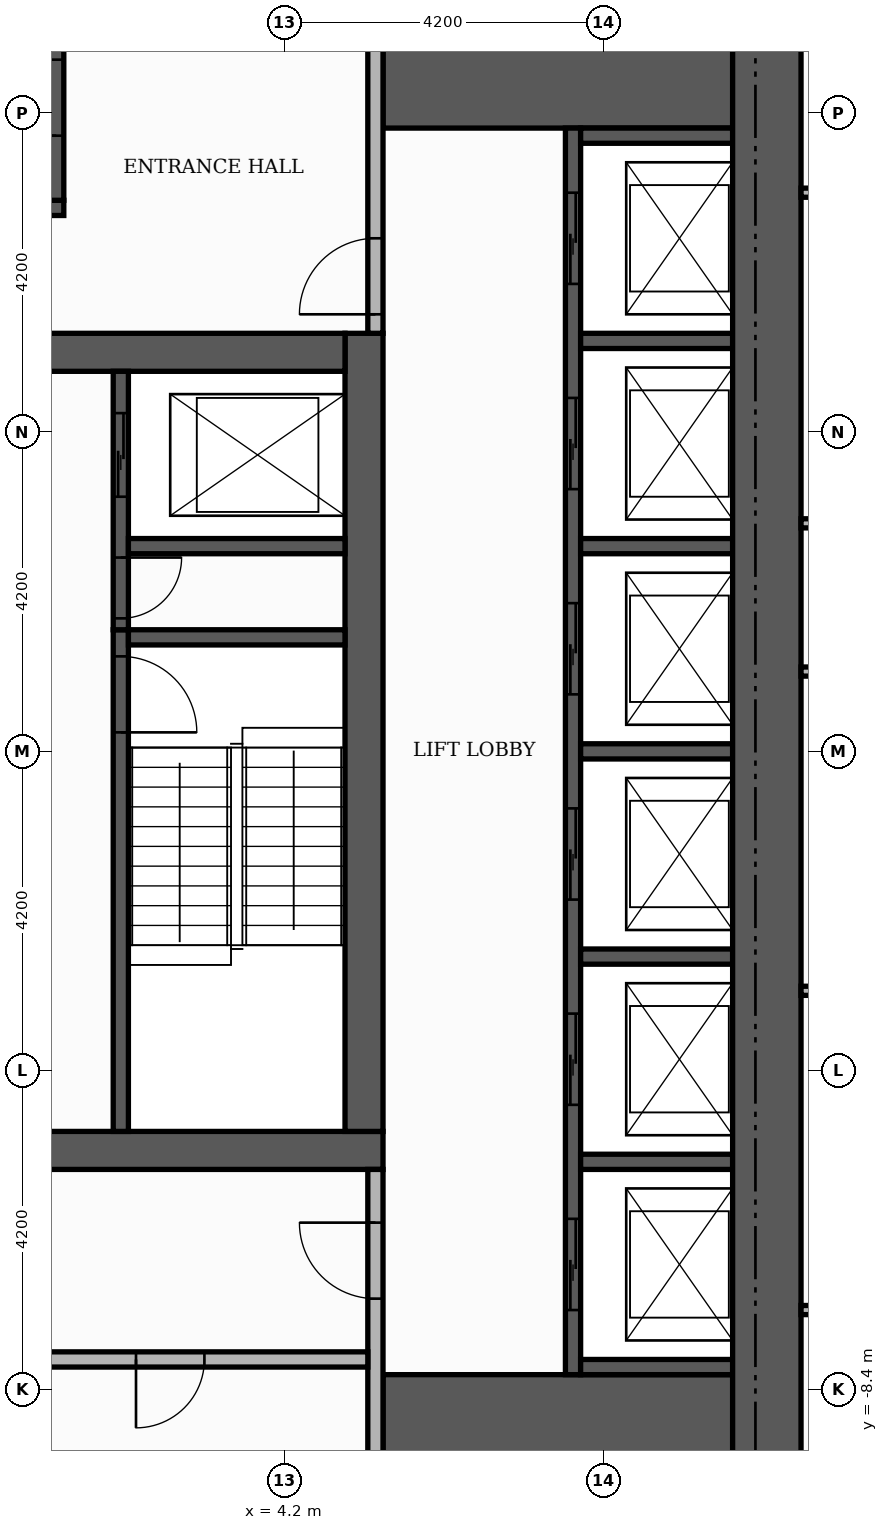
"""IFC4 building model, lengths in metres.
Left out: names, types, materials, properties, quantities, classifications, styles, units other than length and angle.
Written with IfcOpenShell. Run it as: python <this file> out.ifc"""

import sys

from ifc_helpers import new_model, si_unit, direction, frame, frame_2d, origin, place, context, subcontext, project, spatial, rectangle, extrude, element, fill, save


model = new_model("IFC4")
c1 = context("Model", 3, precision=1e-05, world=origin(), true_north=direction((0.0, 1.0)))
c2 = subcontext(c1, "Body", "Model", "MODEL_VIEW")
j1 = project(units=[si_unit("LENGTHUNIT", "METRE"), si_unit("PLANEANGLEUNIT", "RADIAN")], contexts=[c1])
p1 = place(None, origin())
s1 = spatial("IfcSite", under=j1, at=p1, CompositionType="ELEMENT")
p2 = place(p1, origin())
s2 = spatial("IfcBuilding", under=s1, at=p2, CompositionType="ELEMENT")
p3 = place(p2, frame((0.0, 0.0, 196.2)))
s3 = spatial("IfcBuildingStorey", under=s2, at=p3, CompositionType="ELEMENT", Elevation=196.2)
p4 = place(p3, frame((-5.5, -5.25, 0.0), z_axis=(0.0, 0.0, 1.0), x_axis=(1.0, 0.0, 0.0)))
e1 = element("IfcWall", 1, at=p4, inside=s3, PredefinedType="SHEAR", context=c2, shape_type="SweptSolid", body=[
    extrude(rectangle(XDim=11.0, YDim=0.5, at=frame_2d((5.5, 0.0))), origin(), (0.0, 0.0, 1.0), 3.48),
])
p5 = place(p4, frame((4.9, 0.0, 0.0)))
e2 = element("IfcOpeningElement", 2, at=p5, cuts=e1, PredefinedType="OPENING", context=c2, shape_type="SweptSolid", body=[
    extrude(rectangle(XDim=1.2, YDim=2.1, at=frame_2d((0.6, 1.05))), frame((0.0, 0.26, 0.0), z_axis=(0.0, -1.0, 0.0), x_axis=(1.0, 0.0, 0.0)), (0.0, 0.0, 1.0), 0.52),
])
p6 = place(p3, frame((5.25, -5.0, 0.0), z_axis=(0.0, 0.0, 1.0), x_axis=(0.0, 1.0, 0.0)))
e3 = element("IfcWall", 3, at=p6, inside=s3, PredefinedType="SHEAR", context=c2, shape_type="SweptSolid", body=[
    extrude(rectangle(XDim=10.5, YDim=0.5, at=frame_2d((5.25, 0.0))), origin(), (0.0, 0.0, 1.0), 3.48),
])
p7 = place(p3, frame((-5.0, 5.25, 0.0), z_axis=(0.0, 0.0, 1.0), x_axis=(1.0, 0.0, 0.0)))
e4 = element("IfcWall", 4, at=p7, inside=s3, PredefinedType="SHEAR", context=c2, shape_type="SweptSolid", body=[
    extrude(rectangle(XDim=10.0, YDim=0.5, at=frame_2d((5.0, 0.0))), origin(), (0.0, 0.0, 1.0), 3.48),
])
p8 = place(p7, frame((4.4, 0.0, 0.0)))
e5 = element("IfcOpeningElement", 5, at=p8, cuts=e4, PredefinedType="OPENING", context=c2, shape_type="SweptSolid", body=[
    extrude(rectangle(XDim=1.2, YDim=2.1, at=frame_2d((0.6, 1.05))), frame((0.0, 0.26, 0.0), z_axis=(0.0, -1.0, 0.0), x_axis=(1.0, 0.0, 0.0)), (0.0, 0.0, 1.0), 0.52),
])
for number, where, z_axis, x_axis in (
    (6, (5.5, -9.15, 0.0), (0.0, 0.0, 1.0), (1.0, 0.0, 0.0)),
    (7, (5.5, 9.15, 0.0), (0.0, 0.0, 1.0), (1.0, 0.0, 0.0)),
):
    element("IfcWall", number, at=place(p3, frame(where, z_axis=z_axis, x_axis=x_axis)), inside=s3, PredefinedType="SHEAR", context=c2, shape_type="SweptSolid", body=[
        extrude(rectangle(XDim=4.6, YDim=1.9, at=frame_2d((2.3, 0.0))), origin(), (0.0, 0.0, 1.0), 3.48),
    ])
p9 = place(p3, frame((2.05, -5.0, 0.0), z_axis=(0.0, 0.0, 1.0), x_axis=(0.0, 1.0, 0.0)))
e8 = element("IfcWall", 8, at=p9, inside=s3, PredefinedType="SHEAR", context=c2, shape_type="SweptSolid", body=[
    extrude(rectangle(XDim=6.6, YDim=0.2, at=frame_2d((3.3, 0.0))), origin(), (0.0, 0.0, 1.0), 3.48),
])
p10 = place(p9, frame((5.25, 0.0, 0.0)))
e9 = element("IfcOpeningElement", 9, at=p10, cuts=e8, PredefinedType="OPENING", context=c2, shape_type="SweptSolid", body=[
    extrude(rectangle(XDim=1.0, YDim=2.1, at=frame_2d((0.5, 1.05))), frame((0.0, 0.11, 0.0), z_axis=(0.0, -1.0, 0.0), x_axis=(1.0, 0.0, 0.0)), (0.0, 0.0, 1.0), 0.22),
])
p11 = place(p3, frame((2.15, 1.5, 0.0), z_axis=(0.0, 0.0, 1.0), x_axis=(1.0, 0.0, 0.0)))
e10 = element("IfcWall", 10, at=p11, inside=s3, PredefinedType="SHEAR", context=c2, shape_type="SweptSolid", body=[
    extrude(rectangle(XDim=2.85, YDim=0.2, at=frame_2d((1.425, 0.0))), origin(), (0.0, 0.0, 1.0), 3.48),
])
p12 = place(p3, frame((-5.5, 7.15, 0.0), z_axis=(0.0, 0.0, 1.0), x_axis=(1.0, 0.0, 0.0)))
e11 = element("IfcWall", 11, at=p12, inside=s3, PredefinedType="SHEAR", context=c2, shape_type="SweptSolid", body=[
    extrude(rectangle(XDim=6.8, YDim=0.2, at=frame_2d((3.4, 0.0))), origin(), (0.0, 0.0, 1.0), 3.48),
])
p13 = place(p3, frame((1.2, 7.25, 0.0), z_axis=(0.0, 0.0, 1.0), x_axis=(0.0, 1.0, 0.0)))
e12 = element("IfcWall", 12, at=p13, inside=s3, PredefinedType="SHEAR", context=c2, shape_type="SweptSolid", body=[
    extrude(rectangle(XDim=2.85, YDim=0.2, at=frame_2d((1.425, 0.0))), origin(), (0.0, 0.0, 1.0), 3.48),
])
p14 = place(p13, frame((0.85, 0.0, 0.0)))
e13 = element("IfcOpeningElement", 13, at=p14, cuts=e12, PredefinedType="OPENING", context=c2, shape_type="SweptSolid", body=[
    extrude(rectangle(XDim=1.0, YDim=2.1, at=frame_2d((0.5, 1.05))), frame((0.0, 0.11, 0.0), z_axis=(0.0, -1.0, 0.0), x_axis=(1.0, 0.0, 0.0)), (0.0, 0.0, 1.0), 0.22),
])
p15 = place(p3, frame((8.0, -8.2, 0.0), z_axis=(0.0, 0.0, 1.0), x_axis=(0.0, 1.0, 0.0)))
e14 = element("IfcWall", 14, at=p15, inside=s3, PredefinedType="SHEAR", context=c2, shape_type="SweptSolid", body=[
    extrude(rectangle(XDim=16.4, YDim=0.2, at=frame_2d((8.2, 0.0))), origin(), (0.0, 0.0, 1.0), 3.48),
])
p16 = place(p15, frame((0.85, 0.0, 0.0)))
e15 = element("IfcOpeningElement", 15, at=p16, cuts=e14, PredefinedType="OPENING", context=c2, shape_type="SweptSolid", body=[
    extrude(rectangle(XDim=1.2, YDim=2.1, at=frame_2d((0.6, 1.05))), frame((0.0, 0.11, 0.0), z_axis=(0.0, -1.0, 0.0), x_axis=(1.0, 0.0, 0.0)), (0.0, 0.0, 1.0), 0.22),
])
p17 = place(p15, frame((3.55, 0.0, 0.0)))
e16 = element("IfcOpeningElement", 16, at=p17, cuts=e14, PredefinedType="OPENING", context=c2, shape_type="SweptSolid", body=[
    extrude(rectangle(XDim=1.2, YDim=2.1, at=frame_2d((0.6, 1.05))), frame((0.0, 0.11, 0.0), z_axis=(0.0, -1.0, 0.0), x_axis=(1.0, 0.0, 0.0)), (0.0, 0.0, 1.0), 0.22),
])
p18 = place(p15, frame((6.25, 0.0, 0.0)))
e17 = element("IfcOpeningElement", 17, at=p18, cuts=e14, PredefinedType="OPENING", context=c2, shape_type="SweptSolid", body=[
    extrude(rectangle(XDim=1.2, YDim=2.1, at=frame_2d((0.6, 1.05))), frame((0.0, 0.11, 0.0), z_axis=(0.0, -1.0, 0.0), x_axis=(1.0, 0.0, 0.0)), (0.0, 0.0, 1.0), 0.22),
])
p19 = place(p15, frame((8.95, 0.0, 0.0)))
e18 = element("IfcOpeningElement", 18, at=p19, cuts=e14, PredefinedType="OPENING", context=c2, shape_type="SweptSolid", body=[
    extrude(rectangle(XDim=1.2, YDim=2.1, at=frame_2d((0.6, 1.05))), frame((0.0, 0.11, 0.0), z_axis=(0.0, -1.0, 0.0), x_axis=(1.0, 0.0, 0.0)), (0.0, 0.0, 1.0), 0.22),
])
p20 = place(p15, frame((11.65, 0.0, 0.0)))
e19 = element("IfcOpeningElement", 19, at=p20, cuts=e14, PredefinedType="OPENING", context=c2, shape_type="SweptSolid", body=[
    extrude(rectangle(XDim=1.2, YDim=2.1, at=frame_2d((0.6, 1.05))), frame((0.0, 0.11, 0.0), z_axis=(0.0, -1.0, 0.0), x_axis=(1.0, 0.0, 0.0)), (0.0, 0.0, 1.0), 0.22),
])
p21 = place(p15, frame((14.35, 0.0, 0.0)))
e20 = element("IfcOpeningElement", 20, at=p21, cuts=e14, PredefinedType="OPENING", context=c2, shape_type="SweptSolid", body=[
    extrude(rectangle(XDim=1.2, YDim=2.1, at=frame_2d((0.6, 1.05))), frame((0.0, 0.11, 0.0), z_axis=(0.0, -1.0, 0.0), x_axis=(1.0, 0.0, 0.0)), (0.0, 0.0, 1.0), 0.22),
])
for number, where, z_axis, x_axis in (
    (21, (8.1, -8.1, 0.0), (0.0, 0.0, 1.0), (1.0, 0.0, 0.0)),
    (22, (8.1, -5.4, 0.0), (0.0, 0.0, 1.0), (1.0, 0.0, 0.0)),
    (23, (8.1, -2.7, 0.0), (0.0, 0.0, 1.0), (1.0, 0.0, 0.0)),
    (24, (8.1, 0.0, 0.0), (0.0, 0.0, 1.0), (1.0, 0.0, 0.0)),
):
    element("IfcWall", number, at=place(p3, frame(where, z_axis=z_axis, x_axis=x_axis)), inside=s3, PredefinedType="SHEAR", context=c2, shape_type="SweptSolid", body=[
        extrude(rectangle(XDim=2.0, YDim=0.2, at=frame_2d((1.0, 0.0))), origin(), (0.0, 0.0, 1.0), 3.48),
    ])
p22 = place(p3, frame((2.05, 1.6, 0.0), z_axis=(0.0, 0.0, 1.0), x_axis=(0.0, 1.0, 0.0)))
e25 = element("IfcWall", 25, at=p22, inside=s3, PredefinedType="SHEAR", context=c2, shape_type="SweptSolid", body=[
    extrude(rectangle(XDim=3.4, YDim=0.2, at=frame_2d((1.7, 0.0))), origin(), (0.0, 0.0, 1.0), 3.48),
])
p23 = place(p22, frame((1.75, 0.0, 0.0)))
e26 = element("IfcOpeningElement", 26, at=p23, cuts=e25, PredefinedType="OPENING", context=c2, shape_type="SweptSolid", body=[
    extrude(rectangle(XDim=1.1, YDim=2.1, at=frame_2d((0.55, 1.05))), frame((0.0, 0.11, 0.0), z_axis=(0.0, -1.0, 0.0), x_axis=(1.0, 0.0, 0.0)), (0.0, 0.0, 1.0), 0.22),
])
p24 = place(p22, frame((0.15, 0.0, 0.0)))
e27 = element("IfcOpeningElement", 27, at=p24, cuts=e25, PredefinedType="OPENING", context=c2, shape_type="SweptSolid", body=[
    extrude(rectangle(XDim=0.8, YDim=2.1, at=frame_2d((0.4, 1.05))), frame((0.0, 0.11, 0.0), z_axis=(0.0, -1.0, 0.0), x_axis=(1.0, 0.0, 0.0)), (0.0, 0.0, 1.0), 0.22),
])
p25 = place(p3, frame((2.15, 2.7, 0.0), z_axis=(0.0, 0.0, 1.0), x_axis=(1.0, 0.0, 0.0)))
e28 = element("IfcWall", 28, at=p25, inside=s3, PredefinedType="SHEAR", context=c2, shape_type="SweptSolid", body=[
    extrude(rectangle(XDim=2.85, YDim=0.2, at=frame_2d((1.425, 0.0))), origin(), (0.0, 0.0, 1.0), 3.48),
])
for number, where, z_axis, x_axis in (
    (29, (8.1, 2.7, 0.0), (0.0, 0.0, 1.0), (1.0, 0.0, 0.0)),
    (30, (8.1, 5.4, 0.0), (0.0, 0.0, 1.0), (1.0, 0.0, 0.0)),
    (31, (8.1, 8.1, 0.0), (0.0, 0.0, 1.0), (1.0, 0.0, 0.0)),
):
    element("IfcWall", number, at=place(p3, frame(where, z_axis=z_axis, x_axis=x_axis)), inside=s3, PredefinedType="SHEAR", context=c2, shape_type="SweptSolid", body=[
        extrude(rectangle(XDim=2.0, YDim=0.2, at=frame_2d((1.0, 0.0))), origin(), (0.0, 0.0, 1.0), 3.48),
    ])
p26 = place(p3, frame((10.55, -10.1, 0.0), z_axis=(0.0, 0.0, 1.0), x_axis=(0.0, 1.0, 0.0)))
e32 = element("IfcWall", 32, at=p26, inside=s3, PredefinedType="SHEAR", context=c2, shape_type="SweptSolid", body=[
    extrude(rectangle(XDim=20.2, YDim=0.9, at=frame_2d((10.1, 0.0))), origin(), (0.0, 0.0, 1.0), 3.48),
])
p27 = place(p3, frame((5.4, -10.1, 0.0), z_axis=(0.0, 0.0, 1.0), x_axis=(0.0, 1.0, 0.0)))
e33 = element("IfcWall", 33, at=p27, inside=s3, PredefinedType="PARTITIONING", context=c2, shape_type="SweptSolid", body=[
    extrude(rectangle(XDim=4.6, YDim=0.2, at=frame_2d((2.3, 0.0))), origin(), (0.0, 0.0, 1.0), 3.48),
])
p28 = place(p27, frame((2.9, 0.0, 0.0)))
e34 = element("IfcOpeningElement", 34, at=p28, cuts=e33, PredefinedType="OPENING", context=c2, shape_type="SweptSolid", body=[
    extrude(rectangle(XDim=1.0, YDim=2.1, at=frame_2d((0.5, 1.05))), frame((0.0, 0.11, 0.0), z_axis=(0.0, -1.0, 0.0), x_axis=(1.0, 0.0, 0.0)), (0.0, 0.0, 1.0), 0.22),
])
p29 = place(p3, frame((0.1, -8.0, 0.0), z_axis=(0.0, 0.0, 1.0), x_axis=(1.0, 0.0, 0.0)))
e35 = element("IfcWall", 35, at=p29, inside=s3, PredefinedType="PARTITIONING", context=c2, shape_type="SweptSolid", body=[
    extrude(rectangle(XDim=5.2, YDim=0.2, at=frame_2d((2.6, 0.0))), origin(), (0.0, 0.0, 1.0), 3.48),
])
p30 = place(p29, frame((2.15, 0.0, 0.0)))
e36 = element("IfcOpeningElement", 36, at=p30, cuts=e35, PredefinedType="OPENING", context=c2, shape_type="SweptSolid", body=[
    extrude(rectangle(XDim=0.9, YDim=2.1, at=frame_2d((0.45, 1.05))), frame((0.0, 0.11, 0.0), z_axis=(0.0, -1.0, 0.0), x_axis=(1.0, 0.0, 0.0)), (0.0, 0.0, 1.0), 0.22),
])
p31 = place(p3, frame((5.4, 5.5, 0.0), z_axis=(0.0, 0.0, 1.0), x_axis=(0.0, 1.0, 0.0)))
e37 = element("IfcWall", 37, at=p31, inside=s3, PredefinedType="PARTITIONING", context=c2, shape_type="SweptSolid", body=[
    extrude(rectangle(XDim=4.6, YDim=0.2, at=frame_2d((2.3, 0.0))), origin(), (0.0, 0.0, 1.0), 3.48),
])
p32 = place(p31, frame((0.25, 0.0, 0.0)))
e38 = element("IfcOpeningElement", 38, at=p32, cuts=e37, PredefinedType="OPENING", context=c2, shape_type="SweptSolid", body=[
    extrude(rectangle(XDim=1.0, YDim=2.1, at=frame_2d((0.5, 1.05))), frame((0.0, 0.11, 0.0), z_axis=(0.0, -1.0, 0.0), x_axis=(1.0, 0.0, 0.0)), (0.0, 0.0, 1.0), 0.22),
])
p33 = place(p3, frame((11.0, -7.35, 0.0), z_axis=(0.0, 0.0, 1.0), x_axis=(1.0, 0.0, 0.0)))
e39 = element("IfcWall", 39, at=p33, inside=s3, PredefinedType="PARTITIONING", context=c2, shape_type="SweptSolid", body=[
    extrude(rectangle(XDim=8.22, YDim=0.12, at=frame_2d((4.11, 0.0))), origin(), (0.0, 0.0, 1.0), 3.48),
])
p34 = place(p33, frame((3.66, 0.0, 0.0)))
e40 = element("IfcOpeningElement", 40, at=p34, cuts=e39, PredefinedType="OPENING", context=c2, shape_type="SweptSolid", body=[
    extrude(rectangle(XDim=0.9, YDim=2.1, at=frame_2d((0.45, 1.05))), frame((0.0, 0.07, 0.0), z_axis=(0.0, -1.0, 0.0), x_axis=(1.0, 0.0, 0.0)), (0.0, 0.0, 1.0), 0.14),
])
for number, where, z_axis, x_axis in (
    (41, (11.0, -3.15, 0.0), (0.0, 0.0, 1.0), (1.0, 0.0, 0.0)),
    (42, (11.0, 1.05, 0.0), (0.0, 0.0, 1.0), (1.0, 0.0, 0.0)),
    (43, (11.0, 3.0, 0.0), (0.0, 0.0, 1.0), (1.0, 0.0, 0.0)),
    (44, (11.0, 7.35, 0.0), (0.0, 0.0, 1.0), (1.0, 0.0, 0.0)),
):
    element("IfcWall", number, at=place(p3, frame(where, z_axis=z_axis, x_axis=x_axis)), inside=s3, PredefinedType="PARTITIONING", context=c2, shape_type="SweptSolid", body=[
        extrude(rectangle(XDim=8.22, YDim=0.12, at=frame_2d((4.11, 0.0))), origin(), (0.0, 0.0, 1.0), 3.48),
    ])
p35 = place(p16, origin())
e45 = element("IfcDoor", 45, at=p35, inside=s3, OperationType="SLIDING_TO_LEFT", PredefinedType="DOOR", context=c2, shape_type="SweptSolid", body=[
    extrude(rectangle(XDim=1.2, YDim=2.1, at=frame_2d((0.6, 1.05))), frame((0.0, 0.025, 0.0), z_axis=(0.0, -1.0, 0.0), x_axis=(1.0, 0.0, 0.0)), (0.0, 0.0, 1.0), 0.05),
])
fill(e15, e45)
p36 = place(p17, origin())
e46 = element("IfcDoor", 46, at=p36, inside=s3, OperationType="SLIDING_TO_LEFT", PredefinedType="DOOR", context=c2, shape_type="SweptSolid", body=[
    extrude(rectangle(XDim=1.2, YDim=2.1, at=frame_2d((0.6, 1.05))), frame((0.0, 0.025, 0.0), z_axis=(0.0, -1.0, 0.0), x_axis=(1.0, 0.0, 0.0)), (0.0, 0.0, 1.0), 0.05),
])
fill(e16, e46)
p37 = place(p18, origin())
e47 = element("IfcDoor", 47, at=p37, inside=s3, OperationType="SLIDING_TO_LEFT", PredefinedType="DOOR", context=c2, shape_type="SweptSolid", body=[
    extrude(rectangle(XDim=1.2, YDim=2.1, at=frame_2d((0.6, 1.05))), frame((0.0, 0.025, 0.0), z_axis=(0.0, -1.0, 0.0), x_axis=(1.0, 0.0, 0.0)), (0.0, 0.0, 1.0), 0.05),
])
fill(e17, e47)
p38 = place(p19, origin())
e48 = element("IfcDoor", 48, at=p38, inside=s3, OperationType="SLIDING_TO_LEFT", PredefinedType="DOOR", context=c2, shape_type="SweptSolid", body=[
    extrude(rectangle(XDim=1.2, YDim=2.1, at=frame_2d((0.6, 1.05))), frame((0.0, 0.025, 0.0), z_axis=(0.0, -1.0, 0.0), x_axis=(1.0, 0.0, 0.0)), (0.0, 0.0, 1.0), 0.05),
])
fill(e18, e48)
p39 = place(p20, origin())
e49 = element("IfcDoor", 49, at=p39, inside=s3, OperationType="SLIDING_TO_LEFT", PredefinedType="DOOR", context=c2, shape_type="SweptSolid", body=[
    extrude(rectangle(XDim=1.2, YDim=2.1, at=frame_2d((0.6, 1.05))), frame((0.0, 0.025, 0.0), z_axis=(0.0, -1.0, 0.0), x_axis=(1.0, 0.0, 0.0)), (0.0, 0.0, 1.0), 0.05),
])
fill(e19, e49)
p40 = place(p21, origin())
e50 = element("IfcDoor", 50, at=p40, inside=s3, OperationType="SLIDING_TO_LEFT", PredefinedType="DOOR", context=c2, shape_type="SweptSolid", body=[
    extrude(rectangle(XDim=1.2, YDim=2.1, at=frame_2d((0.6, 1.05))), frame((0.0, 0.025, 0.0), z_axis=(0.0, -1.0, 0.0), x_axis=(1.0, 0.0, 0.0)), (0.0, 0.0, 1.0), 0.05),
])
fill(e20, e50)
p41 = place(p23, origin())
e51 = element("IfcDoor", 51, at=p41, inside=s3, OperationType="SLIDING_TO_LEFT", PredefinedType="DOOR", context=c2, shape_type="SweptSolid", body=[
    extrude(rectangle(XDim=1.1, YDim=2.1, at=frame_2d((0.55, 1.05))), frame((0.0, 0.025, 0.0), z_axis=(0.0, -1.0, 0.0), x_axis=(1.0, 0.0, 0.0)), (0.0, 0.0, 1.0), 0.05),
])
fill(e26, e51)
p42 = place(p10, frame((1.0, 0.0, 0.0), z_axis=(0.0, 0.0, 1.0), x_axis=(-1.0, 0.0, 0.0)))
e52 = element("IfcDoor", 52, at=p42, inside=s3, OperationType="SINGLE_SWING_LEFT", PredefinedType="DOOR", context=c2, shape_type="SweptSolid", body=[
    extrude(rectangle(XDim=1.0, YDim=2.1, at=frame_2d((0.5, 1.05))), frame((0.0, 0.025, 0.0), z_axis=(0.0, -1.0, 0.0), x_axis=(1.0, 0.0, 0.0)), (0.0, 0.0, 1.0), 0.05),
])
fill(e9, e52)
p43 = place(p24, frame((0.8, 0.0, 0.0), z_axis=(0.0, 0.0, 1.0), x_axis=(-1.0, 0.0, 0.0)))
e53 = element("IfcDoor", 53, at=p43, inside=s3, OperationType="SINGLE_SWING_RIGHT", PredefinedType="DOOR", context=c2, shape_type="SweptSolid", body=[
    extrude(rectangle(XDim=0.8, YDim=2.1, at=frame_2d((0.4, 1.05))), frame((0.0, 0.025, 0.0), z_axis=(0.0, -1.0, 0.0), x_axis=(1.0, 0.0, 0.0)), (0.0, 0.0, 1.0), 0.05),
])
fill(e27, e53)
p44 = place(p14, origin())
e54 = element("IfcDoor", 54, at=p44, inside=s3, OperationType="SINGLE_SWING_LEFT", PredefinedType="DOOR", context=c2, shape_type="SweptSolid", body=[
    extrude(rectangle(XDim=1.0, YDim=2.1, at=frame_2d((0.5, 1.05))), frame((0.0, 0.025, 0.0), z_axis=(0.0, -1.0, 0.0), x_axis=(1.0, 0.0, 0.0)), (0.0, 0.0, 1.0), 0.05),
])
fill(e13, e54)
p45 = place(p32, origin())
e55 = element("IfcDoor", 55, at=p45, inside=s3, OperationType="SINGLE_SWING_LEFT", PredefinedType="DOOR", context=c2, shape_type="SweptSolid", body=[
    extrude(rectangle(XDim=1.0, YDim=2.1, at=frame_2d((0.5, 1.05))), frame((0.0, 0.025, 0.0), z_axis=(0.0, -1.0, 0.0), x_axis=(1.0, 0.0, 0.0)), (0.0, 0.0, 1.0), 0.05),
])
fill(e38, e55)
p46 = place(p28, origin())
e56 = element("IfcDoor", 56, at=p46, inside=s3, OperationType="SINGLE_SWING_RIGHT", PredefinedType="DOOR", context=c2, shape_type="SweptSolid", body=[
    extrude(rectangle(XDim=1.0, YDim=2.1, at=frame_2d((0.5, 1.05))), frame((0.0, 0.025, 0.0), z_axis=(0.0, -1.0, 0.0), x_axis=(1.0, 0.0, 0.0)), (0.0, 0.0, 1.0), 0.05),
])
fill(e34, e56)
p47 = place(p30, frame((0.9, 0.0, 0.0), z_axis=(0.0, 0.0, 1.0), x_axis=(-1.0, 0.0, 0.0)))
e57 = element("IfcDoor", 57, at=p47, inside=s3, OperationType="SINGLE_SWING_LEFT", PredefinedType="DOOR", context=c2, shape_type="SweptSolid", body=[
    extrude(rectangle(XDim=0.9, YDim=2.1, at=frame_2d((0.45, 1.05))), frame((0.0, 0.025, 0.0), z_axis=(0.0, -1.0, 0.0), x_axis=(1.0, 0.0, 0.0)), (0.0, 0.0, 1.0), 0.05),
])
fill(e36, e57)
save(model, sys.argv[1])
